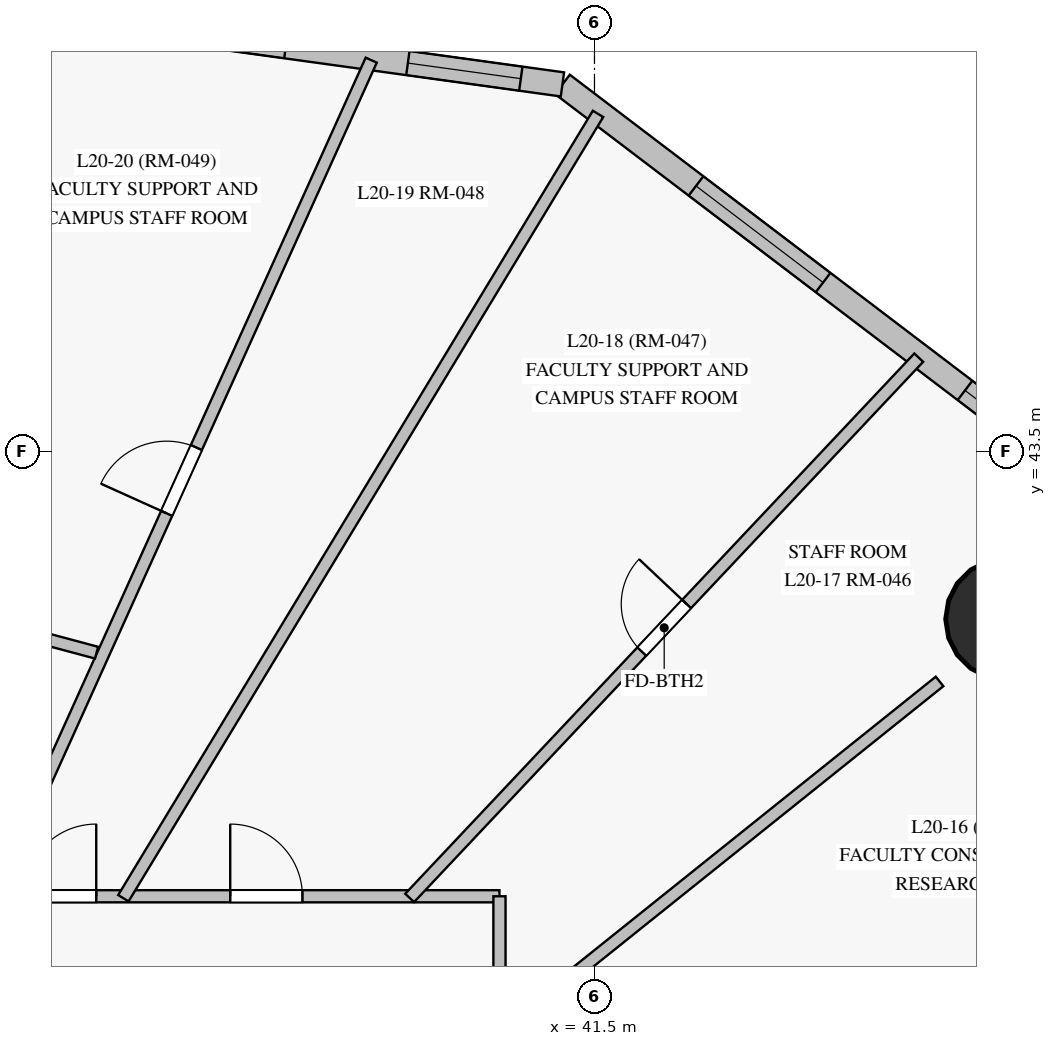
"""IFC4 building model, lengths in metres.
Left out: names, types, materials, properties, quantities, classifications, styles, units other than length and angle.
Written with IfcOpenShell. Run it as: python <this file> out.ifc"""

import sys

from ifc_helpers import new_model, si_unit, direction, frame, frame_2d, origin, origin_with_axes, origin_2d, place, context, subcontext, project, spatial, rectangle, circle, extrude, source, transform, mapped, element, fill, save


model = new_model("IFC4")
c1 = context("Model", 3, precision=1e-05, world=origin(), true_north=direction((0.0, 1.0)))
c2 = subcontext(c1, "Body", "Model", "MODEL_VIEW")
j1 = project(units=[si_unit("LENGTHUNIT", "METRE"), si_unit("PLANEANGLEUNIT", "RADIAN")], contexts=[c1])
p1 = place(None, origin())
s1 = spatial("IfcSite", under=j1, at=p1, CompositionType="ELEMENT")
p2 = place(p1, origin())
s2 = spatial("IfcBuilding", under=s1, at=p2, CompositionType="ELEMENT")
p3 = place(p2, frame((0.0, 0.0, 76.9)))
s3 = spatial("IfcBuildingStorey", under=s2, at=p3, CompositionType="ELEMENT", Elevation=76.9)
m1 = source(origin_with_axes(), c2, "Body", "SweptSolid", [
    extrude(circle(Radius=0.8, at=origin_2d()), origin(), (0.0, 0.0, 1.0), 3.6),
])
p4 = place(p3, frame((46.92, 41.296, 0.0), z_axis=(0.0, 0.0, 1.0), x_axis=(1.0, 0.0, 0.0)))
e1 = element("IfcColumn", 1, at=p4, inside=s3, PredefinedType="COLUMN", context=c2, shape_type="MappedRepresentation", body=[
    mapped(m1, transform((0.0, 0.0, 0.0), scale=1.0)),
])
p5 = place(p3, frame((51.069, 40.737, 0.0), z_axis=(0.0, 0.0, 1.0), x_axis=(-0.796119452113, 0.605139502898, 0.0)))
e2 = element("IfcWall", 2, at=p5, inside=s3, PredefinedType="SOLIDWALL", context=c2, shape_type="SweptSolid", body=[
    extrude(rectangle(XDim=12.548, YDim=0.32, at=frame_2d((6.274, 0.0))), origin(), (0.0, 0.0, 1.0), 3.35),
])
p6 = place(p5, frame((0.503, 0.0, 0.85)))
e3 = element("IfcOpeningElement", 3, at=p6, cuts=e2, PredefinedType="OPENING", context=c2, shape_type="SweptSolid", body=[
    extrude(rectangle(XDim=2.1, YDim=1.95, at=frame_2d((1.05, 0.975))), frame((0.0, 0.17, 0.0), z_axis=(0.0, -1.0, 0.0), x_axis=(1.0, 0.0, 0.0)), (0.0, 0.0, 1.0), 0.34),
])
p7 = place(p5, frame((3.796, 0.0, 0.85)))
e4 = element("IfcOpeningElement", 4, at=p7, cuts=e2, PredefinedType="OPENING", context=c2, shape_type="SweptSolid", body=[
    extrude(rectangle(XDim=2.1, YDim=1.95, at=frame_2d((1.05, 0.975))), frame((0.0, 0.17, 0.0), z_axis=(0.0, -1.0, 0.0), x_axis=(1.0, 0.0, 0.0)), (0.0, 0.0, 1.0), 0.34),
])
p8 = place(p5, frame((8.241, 0.0, 0.85)))
e5 = element("IfcOpeningElement", 5, at=p8, cuts=e2, PredefinedType="OPENING", context=c2, shape_type="SweptSolid", body=[
    extrude(rectangle(XDim=2.1, YDim=1.95, at=frame_2d((1.05, 0.975))), frame((0.0, 0.17, 0.0), z_axis=(0.0, -1.0, 0.0), x_axis=(1.0, 0.0, 0.0)), (0.0, 0.0, 1.0), 0.34),
])
p9 = place(p3, frame((41.079, 48.331, 0.0), z_axis=(0.0, 0.0, 1.0), x_axis=(-0.990610962214, 0.136711087848, 0.0)))
e6 = element("IfcWall", 6, at=p9, inside=s3, PredefinedType="SOLIDWALL", context=c2, shape_type="SweptSolid", body=[
    extrude(rectangle(XDim=10.09, YDim=0.32, at=frame_2d((5.045, 0.0))), origin(), (0.0, 0.0, 1.0), 3.35),
])
p10 = place(p9, frame((0.553, 0.0, 0.85)))
e7 = element("IfcOpeningElement", 7, at=p10, cuts=e6, PredefinedType="OPENING", context=c2, shape_type="SweptSolid", body=[
    extrude(rectangle(XDim=1.5, YDim=1.85, at=frame_2d((0.75, 0.925))), frame((0.0, 0.17, 0.0), z_axis=(0.0, -1.0, 0.0), x_axis=(1.0, 0.0, 0.0)), (0.0, 0.0, 1.0), 0.34),
])
p11 = place(p9, frame((3.673, 0.0, 0.85)))
e8 = element("IfcOpeningElement", 8, at=p11, cuts=e6, PredefinedType="OPENING", context=c2, shape_type="SweptSolid", body=[
    extrude(rectangle(XDim=2.1, YDim=1.95, at=frame_2d((1.05, 0.975))), frame((0.0, 0.17, 0.0), z_axis=(0.0, -1.0, 0.0), x_axis=(1.0, 0.0, 0.0)), (0.0, 0.0, 1.0), 0.34),
])
p12 = place(p9, frame((7.415, 0.0, 0.85)))
e9 = element("IfcOpeningElement", 9, at=p12, cuts=e6, PredefinedType="OPENING", context=c2, shape_type="SweptSolid", body=[
    extrude(rectangle(XDim=2.1, YDim=1.95, at=frame_2d((1.05, 0.975))), frame((0.0, 0.17, 0.0), z_axis=(0.0, -1.0, 0.0), x_axis=(1.0, 0.0, 0.0)), (0.0, 0.0, 1.0), 0.34),
])
p13 = place(p3, frame((10.5, 37.65, 0.0), z_axis=(0.0, 0.0, 1.0), x_axis=(1.0, 0.0, 0.0)))
e10 = element("IfcWall", 10, at=p13, inside=s3, PredefinedType="PARTITIONING", context=c2, shape_type="SweptSolid", body=[
    extrude(rectangle(XDim=29.75, YDim=0.16, at=frame_2d((14.875, 0.0))), origin(), (0.0, 0.0, 1.0), 2.75),
])
p14 = place(p13, frame((26.208, 0.0, 0.0)))
e11 = element("IfcOpeningElement", 11, at=p14, cuts=e10, PredefinedType="OPENING", context=c2, shape_type="SweptSolid", body=[
    extrude(rectangle(XDim=0.95, YDim=2.15, at=frame_2d((0.475, 1.075))), frame((0.0, 0.09, 0.0), z_axis=(0.0, -1.0, 0.0), x_axis=(1.0, 0.0, 0.0)), (0.0, 0.0, 1.0), 0.18),
])
p15 = place(p13, frame((23.495, 0.0, 0.0)))
e12 = element("IfcOpeningElement", 12, at=p15, cuts=e10, PredefinedType="OPENING", context=c2, shape_type="SweptSolid", body=[
    extrude(rectangle(XDim=0.95, YDim=2.15, at=frame_2d((0.475, 1.075))), frame((0.0, 0.09, 0.0), z_axis=(0.0, -1.0, 0.0), x_axis=(1.0, 0.0, 0.0)), (0.0, 0.0, 1.0), 0.18),
])
p16 = place(p13, frame((14.4, 0.0, 0.0)))
e13 = element("IfcOpeningElement", 13, at=p16, cuts=e10, PredefinedType="OPENING", context=c2, shape_type="SweptSolid", body=[
    extrude(rectangle(XDim=0.95, YDim=2.15, at=frame_2d((0.475, 1.075))), frame((0.0, 0.09, 0.0), z_axis=(0.0, -1.0, 0.0), x_axis=(1.0, 0.0, 0.0)), (0.0, 0.0, 1.0), 0.18),
])
p17 = place(p13, frame((9.938, 0.0, 0.0)))
e14 = element("IfcOpeningElement", 14, at=p17, cuts=e10, PredefinedType="OPENING", context=c2, shape_type="SweptSolid", body=[
    extrude(rectangle(XDim=0.95, YDim=2.15, at=frame_2d((0.475, 1.075))), frame((0.0, 0.09, 0.0), z_axis=(0.0, -1.0, 0.0), x_axis=(1.0, 0.0, 0.0)), (0.0, 0.0, 1.0), 0.18),
])
p18 = place(p13, frame((6.962, 0.0, 0.0)))
e15 = element("IfcOpeningElement", 15, at=p18, cuts=e10, PredefinedType="OPENING", context=c2, shape_type="SweptSolid", body=[
    extrude(rectangle(XDim=0.95, YDim=2.15, at=frame_2d((0.475, 1.075))), frame((0.0, 0.09, 0.0), z_axis=(0.0, -1.0, 0.0), x_axis=(1.0, 0.0, 0.0)), (0.0, 0.0, 1.0), 0.18),
])
p19 = place(p3, frame((40.25, 37.65, 0.0), z_axis=(0.0, 0.0, 1.0), x_axis=(0.0, -1.0, 0.0)))
e16 = element("IfcWall", 16, at=p19, inside=s3, PredefinedType="PARTITIONING", context=c2, shape_type="SweptSolid", body=[
    extrude(rectangle(XDim=22.3, YDim=0.16, at=frame_2d((11.15, 0.0))), origin(), (0.0, 0.0, 1.0), 2.75),
])
p20 = place(p19, frame((14.02, 0.0, 0.0)))
e17 = element("IfcOpeningElement", 17, at=p20, cuts=e16, PredefinedType="OPENING", context=c2, shape_type="SweptSolid", body=[
    extrude(rectangle(XDim=0.95, YDim=2.15, at=frame_2d((0.475, 1.075))), frame((0.0, 0.09, 0.0), z_axis=(0.0, -1.0, 0.0), x_axis=(1.0, 0.0, 0.0)), (0.0, 0.0, 1.0), 0.18),
])
p21 = place(p19, frame((10.675, 0.0, 0.0)))
e18 = element("IfcOpeningElement", 18, at=p21, cuts=e16, PredefinedType="OPENING", context=c2, shape_type="SweptSolid", body=[
    extrude(rectangle(XDim=0.95, YDim=2.15, at=frame_2d((0.475, 1.075))), frame((0.0, 0.09, 0.0), z_axis=(0.0, -1.0, 0.0), x_axis=(1.0, 0.0, 0.0)), (0.0, 0.0, 1.0), 0.18),
])
p22 = place(p19, frame((8.167, 0.0, 0.0)))
e19 = element("IfcOpeningElement", 19, at=p22, cuts=e16, PredefinedType="OPENING", context=c2, shape_type="SweptSolid", body=[
    extrude(rectangle(XDim=0.86, YDim=2.1, at=frame_2d((0.43, 1.05))), frame((0.0, 0.09, 0.0), z_axis=(0.0, -1.0, 0.0), x_axis=(1.0, 0.0, 0.0)), (0.0, 0.0, 1.0), 0.18),
])
p23 = place(p19, frame((5.49, 0.0, 0.0)))
e20 = element("IfcOpeningElement", 20, at=p23, cuts=e16, PredefinedType="OPENING", context=c2, shape_type="SweptSolid", body=[
    extrude(rectangle(XDim=0.95, YDim=2.15, at=frame_2d((0.475, 1.075))), frame((0.0, 0.09, 0.0), z_axis=(0.0, -1.0, 0.0), x_axis=(1.0, 0.0, 0.0)), (0.0, 0.0, 1.0), 0.18),
])
p24 = place(p19, frame((2.932, 0.0, 0.0)))
e21 = element("IfcOpeningElement", 21, at=p24, cuts=e16, PredefinedType="OPENING", context=c2, shape_type="SweptSolid", body=[
    extrude(rectangle(XDim=0.95, YDim=2.15, at=frame_2d((0.475, 1.075))), frame((0.0, 0.09, 0.0), z_axis=(0.0, -1.0, 0.0), x_axis=(1.0, 0.0, 0.0)), (0.0, 0.0, 1.0), 0.18),
])
p25 = place(p19, frame((6.622, 0.0, 0.0)))
e22 = element("IfcOpeningElement", 22, at=p25, cuts=e16, PredefinedType="OPENING", context=c2, shape_type="SweptSolid", body=[
    extrude(rectangle(XDim=0.95, YDim=2.15, at=frame_2d((0.475, 1.075))), frame((0.0, 0.09, 0.0), z_axis=(0.0, -1.0, 0.0), x_axis=(1.0, 0.0, 0.0)), (0.0, 0.0, 1.0), 0.18),
])
p26 = place(p3, frame((40.223, 32.396, 0.0), z_axis=(0.0, 0.0, 1.0), x_axis=(0.891304627561, 0.453404963459, 0.0)))
e23 = element("IfcWall", 23, at=p26, inside=s3, PredefinedType="PARTITIONING", context=c2, shape_type="SweptSolid", body=[
    extrude(rectangle(XDim=12.691, YDim=0.16, at=frame_2d((6.345, 0.0))), origin(), (0.0, 0.0, 1.0), 3.35),
])
p27 = place(p3, frame((33.586, 37.623, 0.0), z_axis=(0.0, 0.0, 1.0), x_axis=(0.411385577094, 0.911461412765, 0.0)))
e24 = element("IfcWall", 24, at=p27, inside=s3, PredefinedType="PARTITIONING", context=c2, shape_type="SweptSolid", body=[
    extrude(rectangle(XDim=12.098, YDim=0.16, at=frame_2d((6.049, 0.0))), origin(), (0.0, 0.0, 1.0), 3.35),
])
p28 = place(p27, frame((5.557, 0.0, 0.0)))
e25 = element("IfcOpeningElement", 25, at=p28, cuts=e24, PredefinedType="OPENING", context=c2, shape_type="SweptSolid", body=[
    extrude(rectangle(XDim=0.95, YDim=2.15, at=frame_2d((0.475, 1.075))), frame((0.0, 0.09, 0.0), z_axis=(0.0, -1.0, 0.0), x_axis=(1.0, 0.0, 0.0)), (0.0, 0.0, 1.0), 0.18),
])
p29 = place(p3, frame((35.302, 37.624, 0.0), z_axis=(0.0, 0.0, 1.0), x_axis=(0.517751606505, 0.855530989481, 0.0)))
e26 = element("IfcWall", 26, at=p29, inside=s3, PredefinedType="PARTITIONING", context=c2, shape_type="SweptSolid", body=[
    extrude(rectangle(XDim=12.061, YDim=0.16, at=frame_2d((6.031, 0.0))), origin(), (0.0, 0.0, 1.0), 3.35),
])
p30 = place(p3, frame((39.068, 37.628, 0.0), z_axis=(0.0, 0.0, 1.0), x_axis=(0.685796563099, 0.727793290737, 0.0)))
e27 = element("IfcWall", 27, at=p30, inside=s3, PredefinedType="PARTITIONING", context=c2, shape_type="SweptSolid", body=[
    extrude(rectangle(XDim=9.766, YDim=0.16, at=frame_2d((4.883, 0.0))), origin(), (0.0, 0.0, 1.0), 3.35),
])
p31 = place(p30, frame((4.453, 0.0, 0.0)))
e28 = element("IfcOpeningElement", 28, at=p31, cuts=e27, PredefinedType="OPENING", context=c2, shape_type="SweptSolid", body=[
    extrude(rectangle(XDim=0.86, YDim=2.04, at=frame_2d((0.43, 1.02))), frame((0.0, 0.09, 0.0), z_axis=(0.0, -1.0, 0.0), x_axis=(1.0, 0.0, 0.0)), (0.0, 0.0, 1.0), 0.18),
])
p32 = place(p3, frame((40.227, 35.818, 0.0), z_axis=(0.0, 0.0, 1.0), x_axis=(0.780414563341, 0.625262432363, 0.0)))
e29 = element("IfcWall", 29, at=p32, inside=s3, PredefinedType="PARTITIONING", context=c2, shape_type="SweptSolid", body=[
    extrude(rectangle(XDim=7.449, YDim=0.16, at=frame_2d((3.725, 0.0))), origin(), (0.0, 0.0, 1.0), 2.7),
])
p33 = place(p3, frame((34.949, 40.855, 0.0), z_axis=(0.0, 0.0, 1.0), x_axis=(-0.965928818058, 0.258807879411, 0.0)))
e30 = element("IfcWall", 30, at=p33, inside=s3, PredefinedType="PARTITIONING", context=c2, shape_type="SweptSolid", body=[
    extrude(rectangle(XDim=2.72, YDim=0.16, at=frame_2d((1.36, 0.0))), origin(), (0.0, 0.0, 1.0), 3.35),
])
m2 = source(origin_with_axes(), c2, "Body", "SweptSolid", [
    extrude(rectangle(XDim=2.1, YDim=1.95, at=frame_2d((1.05, 0.975))), frame((0.0, 0.03, 0.0), z_axis=(0.0, -1.0, 0.0), x_axis=(1.0, 0.0, 0.0)), (0.0, 0.0, 1.0), 0.06),
])
p34 = place(p7, origin())
e31 = element("IfcWindow", 31, at=p34, inside=s3, PartitioningType="SINGLE_PANEL", PredefinedType="WINDOW", context=c2, shape_type="MappedRepresentation", body=[
    mapped(m2, transform((0.0, 0.0, 0.0), scale=1.0)),
])
fill(e4, e31)
p35 = place(p8, origin())
e32 = element("IfcWindow", 32, at=p35, inside=s3, PartitioningType="SINGLE_PANEL", PredefinedType="WINDOW", context=c2, shape_type="MappedRepresentation", body=[
    mapped(m2, transform((0.0, 0.0, 0.0), scale=1.0)),
])
fill(e5, e32)
m3 = source(origin_with_axes(), c2, "Body", "SweptSolid", [
    extrude(rectangle(XDim=1.5, YDim=1.85, at=frame_2d((0.75, 0.925))), frame((0.0, 0.03, 0.0), z_axis=(0.0, -1.0, 0.0), x_axis=(1.0, 0.0, 0.0)), (0.0, 0.0, 1.0), 0.06),
])
p36 = place(p10, origin())
e33 = element("IfcWindow", 33, at=p36, inside=s3, PartitioningType="SINGLE_PANEL", PredefinedType="WINDOW", context=c2, shape_type="MappedRepresentation", body=[
    mapped(m3, transform((0.0, 0.0, 0.0), scale=1.0)),
])
fill(e7, e33)
m4 = source(origin_with_axes(), c2, "Body", "SweptSolid", [
    extrude(rectangle(XDim=0.95, YDim=2.15, at=frame_2d((0.475, 1.075))), frame((0.0, 0.025, 0.0), z_axis=(0.0, -1.0, 0.0), x_axis=(1.0, 0.0, 0.0)), (0.0, 0.0, 1.0), 0.05),
])
p37 = place(p14, origin())
e34 = element("IfcDoor", 34, at=p37, inside=s3, OperationType="SINGLE_SWING_LEFT", PredefinedType="DOOR", context=c2, shape_type="MappedRepresentation", body=[
    mapped(m4, transform((0.0, 0.0, 0.0), scale=1.0)),
])
fill(e11, e34)
p38 = place(p15, origin())
e35 = element("IfcDoor", 35, at=p38, inside=s3, OperationType="SINGLE_SWING_RIGHT", PredefinedType="DOOR", context=c2, shape_type="MappedRepresentation", body=[
    mapped(m4, transform((0.0, 0.0, 0.0), scale=1.0)),
])
fill(e12, e35)
p39 = place(p28, origin())
e36 = element("IfcDoor", 36, at=p39, inside=s3, OperationType="SINGLE_SWING_LEFT", PredefinedType="DOOR", context=c2, shape_type="MappedRepresentation", body=[
    mapped(m4, transform((0.0, 0.0, 0.0), scale=1.0)),
])
fill(e25, e36)
m5 = source(origin_with_axes(), c2, "Body", "SweptSolid", [
    extrude(rectangle(XDim=0.86, YDim=2.04, at=frame_2d((0.43, 1.02))), frame((0.0, 0.025, 0.0), z_axis=(0.0, -1.0, 0.0), x_axis=(1.0, 0.0, 0.0)), (0.0, 0.0, 1.0), 0.05),
])
p40 = place(p31, origin())
e37 = element("IfcDoor", 37, at=p40, inside=s3, OperationType="SINGLE_SWING_RIGHT", PredefinedType="DOOR", context=c2, shape_type="MappedRepresentation", body=[
    mapped(m5, transform((0.0, 0.0, 0.0), scale=1.0)),
])
fill(e28, e37)
save(model, sys.argv[1])
